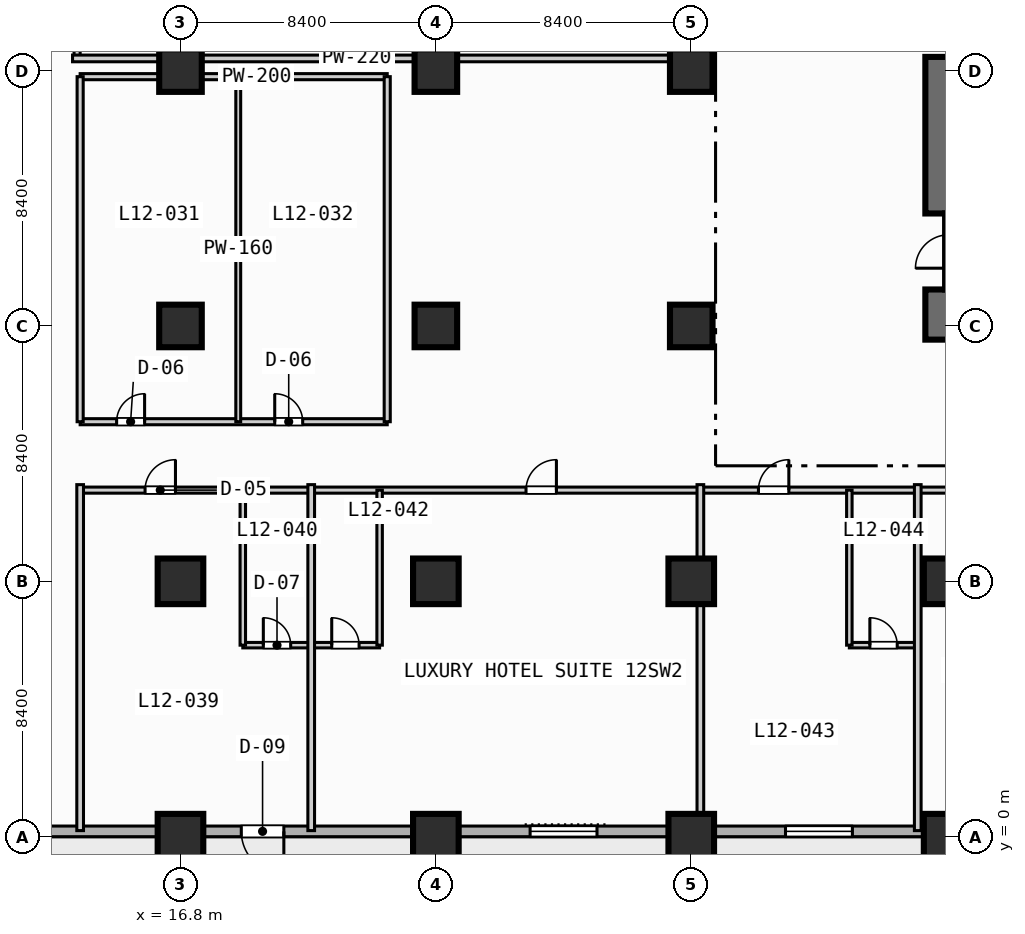
"""IFC4 building model, lengths in metres.
Left out: names, types, materials, properties, quantities, classifications, styles, units other than length and angle.
Written with IfcOpenShell. Run it as: python <this file> out.ifc"""

import sys

from ifc_helpers import new_model, si_unit, direction, frame, frame_2d, origin, origin_2d, place, context, subcontext, project, spatial, rectangle, extrude, element, fill, save


model = new_model("IFC4")
c1 = context("Model", 3, precision=1e-05, world=origin(), true_north=direction((0.0, 1.0)))
c2 = subcontext(c1, "Body", "Model", "MODEL_VIEW")
j1 = project(units=[si_unit("LENGTHUNIT", "METRE"), si_unit("PLANEANGLEUNIT", "RADIAN")], contexts=[c1])
p1 = place(None, origin())
s1 = spatial("IfcSite", under=j1, at=p1, CompositionType="ELEMENT")
p2 = place(p1, origin())
s2 = spatial("IfcBuilding", under=s1, at=p2, CompositionType="ELEMENT")
p3 = place(p2, frame((0.0, 0.0, 54.8)))
s3 = spatial("IfcBuildingStorey", under=s2, at=p3, CompositionType="ELEMENT", Elevation=54.8)
p4 = place(p3, frame((41.75, 16.35, 0.0), z_axis=(0.0, 0.0, 1.0), x_axis=(0.0, 1.0, 0.0)))
e1 = element("IfcWall", 1, at=p4, inside=s3, PredefinedType="SHEAR", context=c2, shape_type="SweptSolid", body=[
    extrude(rectangle(XDim=1.65, YDim=0.9, at=frame_2d((0.825, 0.0))), origin(), (0.0, 0.0, 1.0), 3.55),
])
p5 = place(p3, frame((41.75, 20.5, 0.0), z_axis=(0.0, 0.0, 1.0), x_axis=(0.0, 1.0, 0.0)))
e2 = element("IfcWall", 2, at=p5, inside=s3, PredefinedType="SHEAR", context=c2, shape_type="SweptSolid", body=[
    extrude(rectangle(XDim=5.15, YDim=0.9, at=frame_2d((2.575, 0.0))), origin(), (0.0, 0.0, 1.0), 3.55),
])
for number, where, z_axis, x_axis in (
    (3, (16.8, 0.0, 0.0), (0.0, 0.0, 1.0), (1.0, 0.0, 0.0)),
    (4, (16.8, 8.4, 0.0), (0.0, 0.0, 1.0), (1.0, 0.0, 0.0)),
):
    element("IfcColumn", number, at=place(p3, frame(where, z_axis=z_axis, x_axis=x_axis)), inside=s3, PredefinedType="COLUMN", context=c2, shape_type="SweptSolid", body=[
        extrude(rectangle(XDim=1.5, YDim=1.5, at=origin_2d()), origin(), (0.0, 0.0, 1.0), 3.8),
    ])
for number, where, z_axis, x_axis in (
    (5, (16.8, 16.8, 0.0), (0.0, 0.0, 1.0), (1.0, 0.0, 0.0)),
    (6, (16.8, 25.2, 0.0), (0.0, 0.0, 1.0), (1.0, 0.0, 0.0)),
):
    element("IfcColumn", number, at=place(p3, frame(where, z_axis=z_axis, x_axis=x_axis)), inside=s3, PredefinedType="COLUMN", context=c2, shape_type="SweptSolid", body=[
        extrude(rectangle(XDim=1.4, YDim=1.4, at=origin_2d()), origin(), (0.0, 0.0, 1.0), 3.8),
    ])
for number, where, z_axis, x_axis in (
    (7, (25.2, 0.0, 0.0), (0.0, 0.0, 1.0), (1.0, 0.0, 0.0)),
    (8, (25.2, 8.4, 0.0), (0.0, 0.0, 1.0), (1.0, 0.0, 0.0)),
):
    element("IfcColumn", number, at=place(p3, frame(where, z_axis=z_axis, x_axis=x_axis)), inside=s3, PredefinedType="COLUMN", context=c2, shape_type="SweptSolid", body=[
        extrude(rectangle(XDim=1.5, YDim=1.5, at=origin_2d()), origin(), (0.0, 0.0, 1.0), 3.8),
    ])
for number, where, z_axis, x_axis in (
    (9, (25.2, 16.8, 0.0), (0.0, 0.0, 1.0), (1.0, 0.0, 0.0)),
    (10, (25.2, 25.2, 0.0), (0.0, 0.0, 1.0), (1.0, 0.0, 0.0)),
):
    element("IfcColumn", number, at=place(p3, frame(where, z_axis=z_axis, x_axis=x_axis)), inside=s3, PredefinedType="COLUMN", context=c2, shape_type="SweptSolid", body=[
        extrude(rectangle(XDim=1.4, YDim=1.4, at=origin_2d()), origin(), (0.0, 0.0, 1.0), 3.8),
    ])
for number, where, z_axis, x_axis in (
    (11, (33.6, 0.0, 0.0), (0.0, 0.0, 1.0), (1.0, 0.0, 0.0)),
    (12, (33.6, 8.4, 0.0), (0.0, 0.0, 1.0), (1.0, 0.0, 0.0)),
):
    element("IfcColumn", number, at=place(p3, frame(where, z_axis=z_axis, x_axis=x_axis)), inside=s3, PredefinedType="COLUMN", context=c2, shape_type="SweptSolid", body=[
        extrude(rectangle(XDim=1.5, YDim=1.5, at=origin_2d()), origin(), (0.0, 0.0, 1.0), 3.8),
    ])
for number, where, z_axis, x_axis in (
    (13, (33.6, 16.8, 0.0), (0.0, 0.0, 1.0), (1.0, 0.0, 0.0)),
    (14, (33.6, 25.2, 0.0), (0.0, 0.0, 1.0), (1.0, 0.0, 0.0)),
):
    element("IfcColumn", number, at=place(p3, frame(where, z_axis=z_axis, x_axis=x_axis)), inside=s3, PredefinedType="COLUMN", context=c2, shape_type="SweptSolid", body=[
        extrude(rectangle(XDim=1.4, YDim=1.4, at=origin_2d()), origin(), (0.0, 0.0, 1.0), 3.8),
    ])
for number, where, z_axis, x_axis in (
    (15, (42.0, 0.0, 0.0), (0.0, 0.0, 1.0), (1.0, 0.0, 0.0)),
    (16, (42.0, 8.4, 0.0), (0.0, 0.0, 1.0), (1.0, 0.0, 0.0)),
):
    element("IfcColumn", number, at=place(p3, frame(where, z_axis=z_axis, x_axis=x_axis)), inside=s3, PredefinedType="COLUMN", context=c2, shape_type="SweptSolid", body=[
        extrude(rectangle(XDim=1.5, YDim=1.5, at=origin_2d()), origin(), (0.0, 0.0, 1.0), 3.8),
    ])
p6 = place(p3, frame((89.225, 0.175, 0.0), z_axis=(0.0, 0.0, 1.0), x_axis=(-1.0, 0.0, 0.0)))
e17 = element("IfcWall", 17, at=p6, inside=s3, PredefinedType="STANDARD", context=c2, shape_type="SweptSolid", body=[
    extrude(rectangle(XDim=86.05, YDim=0.35, at=frame_2d((43.025, 0.0))), origin(), (0.0, 0.0, 1.0), 3.55),
])
p7 = place(p6, frame((69.025, 0.0, 0.0)))
e18 = element("IfcOpeningElement", 18, at=p7, cuts=e17, PredefinedType="OPENING", context=c2, shape_type="SweptSolid", body=[
    extrude(rectangle(XDim=1.4, YDim=2.2, at=frame_2d((0.7, 1.1))), frame((0.0, 0.185, 0.0), z_axis=(0.0, -1.0, 0.0), x_axis=(1.0, 0.0, 0.0)), (0.0, 0.0, 1.0), 0.37),
])
p8 = place(p6, frame((58.725, 0.0, 0.85)))
e19 = element("IfcOpeningElement", 19, at=p8, cuts=e17, PredefinedType="OPENING", context=c2, shape_type="SweptSolid", body=[
    extrude(rectangle(XDim=2.2, YDim=1.8, at=frame_2d((1.1, 0.9))), frame((0.0, 0.185, 0.0), z_axis=(0.0, -1.0, 0.0), x_axis=(1.0, 0.0, 0.0)), (0.0, 0.0, 1.0), 0.37),
])
p9 = place(p6, frame((50.325, 0.0, 0.85)))
e20 = element("IfcOpeningElement", 20, at=p9, cuts=e17, PredefinedType="OPENING", context=c2, shape_type="SweptSolid", body=[
    extrude(rectangle(XDim=2.2, YDim=1.8, at=frame_2d((1.1, 0.9))), frame((0.0, 0.185, 0.0), z_axis=(0.0, -1.0, 0.0), x_axis=(1.0, 0.0, 0.0)), (0.0, 0.0, 1.0), 0.37),
])
p10 = place(p6, frame((41.925, 0.0, 0.85)))
e21 = element("IfcOpeningElement", 21, at=p10, cuts=e17, PredefinedType="OPENING", context=c2, shape_type="SweptSolid", body=[
    extrude(rectangle(XDim=2.2, YDim=1.8, at=frame_2d((1.1, 0.9))), frame((0.0, 0.185, 0.0), z_axis=(0.0, -1.0, 0.0), x_axis=(1.0, 0.0, 0.0)), (0.0, 0.0, 1.0), 0.37),
])
p11 = place(p6, frame((27.775, 0.0, 0.85)))
e22 = element("IfcOpeningElement", 22, at=p11, cuts=e17, PredefinedType="OPENING", context=c2, shape_type="SweptSolid", body=[
    extrude(rectangle(XDim=1.8, YDim=1.8, at=frame_2d((0.9, 0.9))), frame((0.0, 0.185, 0.0), z_axis=(0.0, -1.0, 0.0), x_axis=(1.0, 0.0, 0.0)), (0.0, 0.0, 1.0), 0.37),
])
p12 = place(p3, frame((42.075, 18.0, 0.0), z_axis=(0.0, 0.0, 1.0), x_axis=(0.0, 1.0, 0.0)))
e23 = element("IfcWall", 23, at=p12, inside=s3, PredefinedType="SOLIDWALL", context=c2, shape_type="SweptSolid", body=[
    extrude(rectangle(XDim=2.5, YDim=0.25, at=frame_2d((1.25, 0.0))), origin(), (0.0, 0.0, 1.0), 3.55),
])
p13 = place(p12, frame((0.7, 0.0, 0.0)))
e24 = element("IfcOpeningElement", 24, at=p13, cuts=e23, PredefinedType="OPENING", context=c2, shape_type="SweptSolid", body=[
    extrude(rectangle(XDim=1.1, YDim=2.15, at=frame_2d((0.55, 1.075))), frame((0.0, 0.135, 0.0), z_axis=(0.0, -1.0, 0.0), x_axis=(1.0, 0.0, 0.0)), (0.0, 0.0, 1.0), 0.27),
])
p14 = place(p3, frame((13.5, 13.65, 0.0), z_axis=(0.0, 0.0, 1.0), x_axis=(1.0, 0.0, 0.0)))
e25 = element("IfcWall", 25, at=p14, inside=s3, PredefinedType="PARTITIONING", context=c2, shape_type="SweptSolid", body=[
    extrude(rectangle(XDim=10.1, YDim=0.2, at=frame_2d((5.05, 0.0))), origin(), (0.0, 0.0, 1.0), 3.55),
])
p15 = place(p14, frame((1.2, 0.0, 0.0)))
e26 = element("IfcOpeningElement", 26, at=p15, cuts=e25, PredefinedType="OPENING", context=c2, shape_type="SweptSolid", body=[
    extrude(rectangle(XDim=0.92, YDim=2.1, at=frame_2d((0.46, 1.05))), frame((0.0, 0.11, 0.0), z_axis=(0.0, -1.0, 0.0), x_axis=(1.0, 0.0, 0.0)), (0.0, 0.0, 1.0), 0.22),
])
p16 = place(p14, frame((6.4, 0.0, 0.0)))
e27 = element("IfcOpeningElement", 27, at=p16, cuts=e25, PredefinedType="OPENING", context=c2, shape_type="SweptSolid", body=[
    extrude(rectangle(XDim=0.92, YDim=2.1, at=frame_2d((0.46, 1.05))), frame((0.0, 0.11, 0.0), z_axis=(0.0, -1.0, 0.0), x_axis=(1.0, 0.0, 0.0)), (0.0, 0.0, 1.0), 0.22),
])
p17 = place(p3, frame((18.7, 13.65, 0.0), z_axis=(0.0, 0.0, 1.0), x_axis=(0.0, 1.0, 0.0)))
e28 = element("IfcWall", 28, at=p17, inside=s3, PredefinedType="PARTITIONING", context=c2, shape_type="SweptSolid", body=[
    extrude(rectangle(XDim=11.35, YDim=0.16, at=frame_2d((5.675, 0.0))), origin(), (0.0, 0.0, 1.0), 3.55),
])
p18 = place(p3, frame((13.5, 25.0, 0.0), z_axis=(0.0, 0.0, 1.0), x_axis=(1.0, 0.0, 0.0)))
e29 = element("IfcWall", 29, at=p18, inside=s3, PredefinedType="PARTITIONING", context=c2, shape_type="SweptSolid", body=[
    extrude(rectangle(XDim=10.1, YDim=0.2, at=frame_2d((5.05, 0.0))), origin(), (0.0, 0.0, 1.0), 2.8),
])
for number, where, z_axis, x_axis in (
    (30, (13.5, 13.65, 0.0), (0.0, 0.0, 1.0), (0.0, 1.0, 0.0)),
    (31, (23.6, 13.65, 0.0), (0.0, 0.0, 1.0), (0.0, 1.0, 0.0)),
):
    element("IfcWall", number, at=place(p3, frame(where, z_axis=z_axis, x_axis=x_axis)), inside=s3, PredefinedType="PARTITIONING", context=c2, shape_type="SweptSolid", body=[
        extrude(rectangle(XDim=11.35, YDim=0.2, at=frame_2d((5.675, 0.0))), origin(), (0.0, 0.0, 1.0), 3.55),
    ])
p19 = place(p3, frame((13.4, 25.6, 0.0), z_axis=(0.0, 0.0, 1.0), x_axis=(0.0, 1.0, 0.0)))
e32 = element("IfcWall", 32, at=p19, inside=s3, PredefinedType="PARTITIONING", context=c2, shape_type="SweptSolid", body=[
    extrude(rectangle(XDim=13.6, YDim=0.2, at=frame_2d((6.8, 0.0))), origin(), (0.0, 0.0, 1.0), 3.55),
])
p20 = place(p19, frame((1.735, 0.0, 0.0)))
e33 = element("IfcOpeningElement", 33, at=p20, cuts=e32, PredefinedType="OPENING", context=c2, shape_type="SweptSolid", body=[
    extrude(rectangle(XDim=1.0, YDim=2.15, at=frame_2d((0.5, 1.075))), frame((0.0, 0.11, 0.0), z_axis=(0.0, -1.0, 0.0), x_axis=(1.0, 0.0, 0.0)), (0.0, 0.0, 1.0), 0.22),
])
p21 = place(p19, frame((8.535, 0.0, 0.0)))
e34 = element("IfcOpeningElement", 34, at=p21, cuts=e32, PredefinedType="OPENING", context=c2, shape_type="SweptSolid", body=[
    extrude(rectangle(XDim=1.0, YDim=2.15, at=frame_2d((0.5, 1.075))), frame((0.0, 0.11, 0.0), z_axis=(0.0, -1.0, 0.0), x_axis=(1.0, 0.0, 0.0)), (0.0, 0.0, 1.0), 0.22),
])
p22 = place(p3, frame((13.25, 25.6, 0.0), z_axis=(0.0, 0.0, 1.0), x_axis=(1.0, 0.0, 0.0)))
e35 = element("IfcWall", 35, at=p22, inside=s3, PredefinedType="PARTITIONING", context=c2, shape_type="SweptSolid", body=[
    extrude(rectangle(XDim=20.18, YDim=0.22, at=frame_2d((10.09, 0.0))), origin(), (0.0, 0.0, 1.0), 3.55),
])
p23 = place(p3, frame((13.5, 11.4, 0.0), z_axis=(0.0, 0.0, 1.0), x_axis=(1.0, 0.0, 0.0)))
e36 = element("IfcWall", 36, at=p23, inside=s3, PredefinedType="PARTITIONING", context=c2, shape_type="SweptSolid", body=[
    extrude(rectangle(XDim=50.3, YDim=0.2, at=frame_2d((25.15, 0.0))), origin(), (0.0, 0.0, 1.0), 3.55),
])
p24 = place(p23, frame((2.135, 0.0, 0.0)))
e37 = element("IfcOpeningElement", 37, at=p24, cuts=e36, PredefinedType="OPENING", context=c2, shape_type="SweptSolid", body=[
    extrude(rectangle(XDim=1.0, YDim=2.15, at=frame_2d((0.5, 1.075))), frame((0.0, 0.11, 0.0), z_axis=(0.0, -1.0, 0.0), x_axis=(1.0, 0.0, 0.0)), (0.0, 0.0, 1.0), 0.22),
])
p25 = place(p23, frame((14.665, 0.0, 0.0)))
e38 = element("IfcOpeningElement", 38, at=p25, cuts=e36, PredefinedType="OPENING", context=c2, shape_type="SweptSolid", body=[
    extrude(rectangle(XDim=1.0, YDim=2.15, at=frame_2d((0.5, 1.075))), frame((0.0, 0.11, 0.0), z_axis=(0.0, -1.0, 0.0), x_axis=(1.0, 0.0, 0.0)), (0.0, 0.0, 1.0), 0.22),
])
p26 = place(p23, frame((22.31, 0.0, 0.0)))
e39 = element("IfcOpeningElement", 39, at=p26, cuts=e36, PredefinedType="OPENING", context=c2, shape_type="SweptSolid", body=[
    extrude(rectangle(XDim=1.0, YDim=2.15, at=frame_2d((0.5, 1.075))), frame((0.0, 0.11, 0.0), z_axis=(0.0, -1.0, 0.0), x_axis=(1.0, 0.0, 0.0)), (0.0, 0.0, 1.0), 0.22),
])
p27 = place(p23, frame((32.51, 0.0, 0.0)))
e40 = element("IfcOpeningElement", 40, at=p27, cuts=e36, PredefinedType="OPENING", context=c2, shape_type="SweptSolid", body=[
    extrude(rectangle(XDim=1.0, YDim=2.15, at=frame_2d((0.5, 1.075))), frame((0.0, 0.11, 0.0), z_axis=(0.0, -1.0, 0.0), x_axis=(1.0, 0.0, 0.0)), (0.0, 0.0, 1.0), 0.22),
])
p28 = place(p23, frame((43.885, 0.0, 0.0)))
e41 = element("IfcOpeningElement", 41, at=p28, cuts=e36, PredefinedType="OPENING", context=c2, shape_type="SweptSolid", body=[
    extrude(rectangle(XDim=1.0, YDim=2.15, at=frame_2d((0.5, 1.075))), frame((0.0, 0.11, 0.0), z_axis=(0.0, -1.0, 0.0), x_axis=(1.0, 0.0, 0.0)), (0.0, 0.0, 1.0), 0.22),
])
p29 = place(p3, frame((13.5, 0.2, 0.0), z_axis=(0.0, 0.0, 1.0), x_axis=(0.0, 1.0, 0.0)))
e42 = element("IfcWall", 42, at=p29, inside=s3, PredefinedType="PARTITIONING", context=c2, shape_type="SweptSolid", body=[
    extrude(rectangle(XDim=11.38, YDim=0.22, at=frame_2d((5.69, 0.0))), origin(), (0.0, 0.0, 1.0), 3.55),
])
p30 = place(p3, frame((18.85, 6.3, 0.0), z_axis=(0.0, 0.0, 1.0), x_axis=(1.0, 0.0, 0.0)))
e43 = element("IfcWall", 43, at=p30, inside=s3, PredefinedType="PLUMBINGWALL", context=c2, shape_type="SweptSolid", body=[
    extrude(rectangle(XDim=4.5, YDim=0.18, at=frame_2d((2.25, 0.0))), origin(), (0.0, 0.0, 1.0), 3.55),
])
p31 = place(p30, frame((0.675, 0.0, 0.0)))
e44 = element("IfcOpeningElement", 44, at=p31, cuts=e43, PredefinedType="OPENING", context=c2, shape_type="SweptSolid", body=[
    extrude(rectangle(XDim=0.9, YDim=2.1, at=frame_2d((0.45, 1.05))), frame((0.0, 0.1, 0.0), z_axis=(0.0, -1.0, 0.0), x_axis=(1.0, 0.0, 0.0)), (0.0, 0.0, 1.0), 0.2),
])
p32 = place(p30, frame((2.925, 0.0, 0.0)))
e45 = element("IfcOpeningElement", 45, at=p32, cuts=e43, PredefinedType="OPENING", context=c2, shape_type="SweptSolid", body=[
    extrude(rectangle(XDim=0.9, YDim=2.1, at=frame_2d((0.45, 1.05))), frame((0.0, 0.1, 0.0), z_axis=(0.0, -1.0, 0.0), x_axis=(1.0, 0.0, 0.0)), (0.0, 0.0, 1.0), 0.2),
])
p33 = place(p3, frame((18.85, 6.3, 0.0), z_axis=(0.0, 0.0, 1.0), x_axis=(0.0, 1.0, 0.0)))
e46 = element("IfcWall", 46, at=p33, inside=s3, PredefinedType="PLUMBINGWALL", context=c2, shape_type="SweptSolid", body=[
    extrude(rectangle(XDim=5.1, YDim=0.18, at=frame_2d((2.55, 0.0))), origin(), (0.0, 0.0, 1.0), 3.55),
])
p34 = place(p3, frame((21.1, 0.2, 0.0), z_axis=(0.0, 0.0, 1.0), x_axis=(0.0, 1.0, 0.0)))
e47 = element("IfcWall", 47, at=p34, inside=s3, PredefinedType="PARTITIONING", context=c2, shape_type="SweptSolid", body=[
    extrude(rectangle(XDim=11.38, YDim=0.22, at=frame_2d((5.69, 0.0))), origin(), (0.0, 0.0, 1.0), 3.55),
])
p35 = place(p3, frame((23.35, 6.3, 0.0), z_axis=(0.0, 0.0, 1.0), x_axis=(0.0, 1.0, 0.0)))
e48 = element("IfcWall", 48, at=p35, inside=s3, PredefinedType="PLUMBINGWALL", context=c2, shape_type="SweptSolid", body=[
    extrude(rectangle(XDim=5.1, YDim=0.18, at=frame_2d((2.55, 0.0))), origin(), (0.0, 0.0, 1.0), 3.55),
])
p36 = place(p3, frame((33.9, 0.2, 0.0), z_axis=(0.0, 0.0, 1.0), x_axis=(0.0, 1.0, 0.0)))
e49 = element("IfcWall", 49, at=p36, inside=s3, PredefinedType="PARTITIONING", context=c2, shape_type="SweptSolid", body=[
    extrude(rectangle(XDim=11.38, YDim=0.22, at=frame_2d((5.69, 0.0))), origin(), (0.0, 0.0, 1.0), 2.8),
])
p37 = place(p3, frame((38.8, 6.3, 0.0), z_axis=(0.0, 0.0, 1.0), x_axis=(1.0, 0.0, 0.0)))
e50 = element("IfcWall", 50, at=p37, inside=s3, PredefinedType="PLUMBINGWALL", context=c2, shape_type="SweptSolid", body=[
    extrude(rectangle(XDim=2.25, YDim=0.18, at=frame_2d((1.125, 0.0))), origin(), (0.0, 0.0, 1.0), 3.55),
])
p38 = place(p37, frame((0.675, 0.0, 0.0)))
e51 = element("IfcOpeningElement", 51, at=p38, cuts=e50, PredefinedType="OPENING", context=c2, shape_type="SweptSolid", body=[
    extrude(rectangle(XDim=0.9, YDim=2.1, at=frame_2d((0.45, 1.05))), frame((0.0, 0.1, 0.0), z_axis=(0.0, -1.0, 0.0), x_axis=(1.0, 0.0, 0.0)), (0.0, 0.0, 1.0), 0.2),
])
p39 = place(p3, frame((38.8, 6.3, 0.0), z_axis=(0.0, 0.0, 1.0), x_axis=(0.0, 1.0, 0.0)))
e52 = element("IfcWall", 52, at=p39, inside=s3, PredefinedType="PLUMBINGWALL", context=c2, shape_type="SweptSolid", body=[
    extrude(rectangle(XDim=5.1, YDim=0.18, at=frame_2d((2.55, 0.0))), origin(), (0.0, 0.0, 1.0), 3.55),
])
p40 = place(p3, frame((41.05, 0.2, 0.0), z_axis=(0.0, 0.0, 1.0), x_axis=(0.0, 1.0, 0.0)))
e53 = element("IfcWall", 53, at=p40, inside=s3, PredefinedType="PARTITIONING", context=c2, shape_type="SweptSolid", body=[
    extrude(rectangle(XDim=11.38, YDim=0.22, at=frame_2d((5.69, 0.0))), origin(), (0.0, 0.0, 1.0), 3.55),
])
p41 = place(p7, origin())
e54 = element("IfcDoor", 54, at=p41, inside=s3, OperationType="SINGLE_SWING_LEFT", PredefinedType="DOOR", context=c2, shape_type="SweptSolid", body=[
    extrude(rectangle(XDim=1.4, YDim=2.2, at=frame_2d((0.7, 1.1))), frame((0.0, 0.025, 0.0), z_axis=(0.0, -1.0, 0.0), x_axis=(1.0, 0.0, 0.0)), (0.0, 0.0, 1.0), 0.05),
])
fill(e18, e54)
p42 = place(p8, origin())
e55 = element("IfcWindow", 55, at=p42, inside=s3, PartitioningType="SINGLE_PANEL", PredefinedType="WINDOW", context=c2, shape_type="SweptSolid", body=[
    extrude(rectangle(XDim=2.2, YDim=1.8, at=frame_2d((1.1, 0.9))), frame((0.0, 0.03, 0.0), z_axis=(0.0, -1.0, 0.0), x_axis=(1.0, 0.0, 0.0)), (0.0, 0.0, 1.0), 0.06),
])
fill(e19, e55)
p43 = place(p9, origin())
e56 = element("IfcWindow", 56, at=p43, inside=s3, PartitioningType="SINGLE_PANEL", PredefinedType="WINDOW", context=c2, shape_type="SweptSolid", body=[
    extrude(rectangle(XDim=2.2, YDim=1.8, at=frame_2d((1.1, 0.9))), frame((0.0, 0.03, 0.0), z_axis=(0.0, -1.0, 0.0), x_axis=(1.0, 0.0, 0.0)), (0.0, 0.0, 1.0), 0.06),
])
fill(e20, e56)
p44 = place(p15, origin())
e57 = element("IfcDoor", 57, at=p44, inside=s3, OperationType="SINGLE_SWING_RIGHT", PredefinedType="DOOR", context=c2, shape_type="SweptSolid", body=[
    extrude(rectangle(XDim=0.92, YDim=2.1, at=frame_2d((0.46, 1.05))), frame((0.0, 0.025, 0.0), z_axis=(0.0, -1.0, 0.0), x_axis=(1.0, 0.0, 0.0)), (0.0, 0.0, 1.0), 0.05),
])
fill(e26, e57)
p45 = place(p16, origin())
e58 = element("IfcDoor", 58, at=p45, inside=s3, OperationType="SINGLE_SWING_LEFT", PredefinedType="DOOR", context=c2, shape_type="SweptSolid", body=[
    extrude(rectangle(XDim=0.92, YDim=2.1, at=frame_2d((0.46, 1.05))), frame((0.0, 0.025, 0.0), z_axis=(0.0, -1.0, 0.0), x_axis=(1.0, 0.0, 0.0)), (0.0, 0.0, 1.0), 0.05),
])
fill(e27, e58)
p46 = place(p24, origin())
e59 = element("IfcDoor", 59, at=p46, inside=s3, OperationType="SINGLE_SWING_RIGHT", PredefinedType="DOOR", context=c2, shape_type="SweptSolid", body=[
    extrude(rectangle(XDim=1.0, YDim=2.15, at=frame_2d((0.5, 1.075))), frame((0.0, 0.025, 0.0), z_axis=(0.0, -1.0, 0.0), x_axis=(1.0, 0.0, 0.0)), (0.0, 0.0, 1.0), 0.05),
])
fill(e37, e59)
p47 = place(p25, origin())
e60 = element("IfcDoor", 60, at=p47, inside=s3, OperationType="SINGLE_SWING_RIGHT", PredefinedType="DOOR", context=c2, shape_type="SweptSolid", body=[
    extrude(rectangle(XDim=1.0, YDim=2.15, at=frame_2d((0.5, 1.075))), frame((0.0, 0.025, 0.0), z_axis=(0.0, -1.0, 0.0), x_axis=(1.0, 0.0, 0.0)), (0.0, 0.0, 1.0), 0.05),
])
fill(e38, e60)
p48 = place(p26, origin())
e61 = element("IfcDoor", 61, at=p48, inside=s3, OperationType="SINGLE_SWING_RIGHT", PredefinedType="DOOR", context=c2, shape_type="SweptSolid", body=[
    extrude(rectangle(XDim=1.0, YDim=2.15, at=frame_2d((0.5, 1.075))), frame((0.0, 0.025, 0.0), z_axis=(0.0, -1.0, 0.0), x_axis=(1.0, 0.0, 0.0)), (0.0, 0.0, 1.0), 0.05),
])
fill(e39, e61)
p49 = place(p31, origin())
e62 = element("IfcDoor", 62, at=p49, inside=s3, OperationType="SINGLE_SWING_LEFT", PredefinedType="DOOR", context=c2, shape_type="SweptSolid", body=[
    extrude(rectangle(XDim=0.9, YDim=2.1, at=frame_2d((0.45, 1.05))), frame((0.0, 0.025, 0.0), z_axis=(0.0, -1.0, 0.0), x_axis=(1.0, 0.0, 0.0)), (0.0, 0.0, 1.0), 0.05),
])
fill(e44, e62)
p50 = place(p32, origin())
e63 = element("IfcDoor", 63, at=p50, inside=s3, OperationType="SINGLE_SWING_LEFT", PredefinedType="DOOR", context=c2, shape_type="SweptSolid", body=[
    extrude(rectangle(XDim=0.9, YDim=2.1, at=frame_2d((0.45, 1.05))), frame((0.0, 0.025, 0.0), z_axis=(0.0, -1.0, 0.0), x_axis=(1.0, 0.0, 0.0)), (0.0, 0.0, 1.0), 0.05),
])
fill(e45, e63)
p51 = place(p38, origin())
e64 = element("IfcDoor", 64, at=p51, inside=s3, OperationType="SINGLE_SWING_LEFT", PredefinedType="DOOR", context=c2, shape_type="SweptSolid", body=[
    extrude(rectangle(XDim=0.9, YDim=2.1, at=frame_2d((0.45, 1.05))), frame((0.0, 0.025, 0.0), z_axis=(0.0, -1.0, 0.0), x_axis=(1.0, 0.0, 0.0)), (0.0, 0.0, 1.0), 0.05),
])
fill(e51, e64)
save(model, sys.argv[1])
